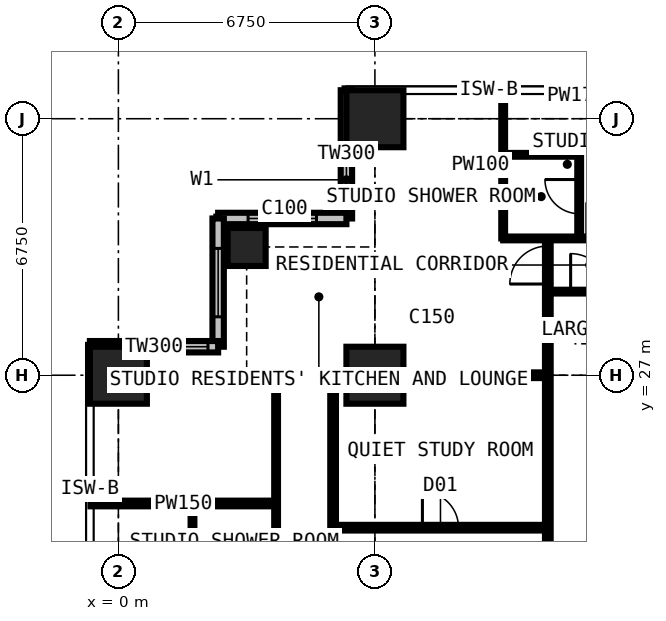
"""IFC4 building model, lengths in metres.
Left out: names, types, materials, properties, quantities, classifications, styles, units other than length and angle.
Written with IfcOpenShell. Run it as: python <this file> out.ifc"""

import sys

from ifc_helpers import new_model, si_unit, direction, frame, frame_2d, origin, origin_2d, place, context, subcontext, project, spatial, rectangle, extrude, element, fill, save


model = new_model("IFC4")
c1 = context("Model", 3, precision=1e-05, world=origin(), true_north=direction((0.0, 1.0)))
c2 = subcontext(c1, "Body", "Model", "MODEL_VIEW")
j1 = project(units=[si_unit("LENGTHUNIT", "METRE"), si_unit("PLANEANGLEUNIT", "RADIAN")], contexts=[c1])
p1 = place(None, origin())
s1 = spatial("IfcSite", under=j1, at=p1, CompositionType="ELEMENT")
p2 = place(p1, origin())
s2 = spatial("IfcBuilding", under=s1, at=p2, CompositionType="ELEMENT")
p3 = place(p2, frame((0.0, 0.0, 130.5)))
s3 = spatial("IfcBuildingStorey", under=s2, at=p3, CompositionType="ELEMENT", Elevation=130.5)
p4 = place(p3, frame((0.0, 27.0, 0.0), z_axis=(0.0, 0.0, 1.0), x_axis=(1.0, 0.0, 0.0)))
e1 = element("IfcColumn", 1, at=p4, inside=s3, PredefinedType="COLUMN", context=c2, shape_type="SweptSolid", body=[
    extrude(rectangle(XDim=1.5, YDim=1.5, at=origin_2d()), origin(), (0.0, 0.0, 1.0), 3.6),
])
p5 = place(p3, frame((3.375, 30.375, 0.0), z_axis=(0.0, 0.0, 1.0), x_axis=(1.0, 0.0, 0.0)))
e2 = element("IfcColumn", 2, at=p5, inside=s3, PredefinedType="COLUMN", context=c2, shape_type="SweptSolid", body=[
    extrude(rectangle(XDim=1.0, YDim=1.0, at=origin_2d()), origin(), (0.0, 0.0, 1.0), 3.6),
])
for number, where, z_axis, x_axis in (
    (3, (6.75, 27.0, 0.0), (0.0, 0.0, 1.0), (1.0, 0.0, 0.0)),
    (4, (6.75, 33.75, 0.0), (0.0, 0.0, 1.0), (1.0, 0.0, 0.0)),
):
    element("IfcColumn", number, at=place(p3, frame(where, z_axis=z_axis, x_axis=x_axis)), inside=s3, PredefinedType="COLUMN", context=c2, shape_type="SweptSolid", body=[
        extrude(rectangle(XDim=1.5, YDim=1.5, at=origin_2d()), origin(), (0.0, 0.0, 1.0), 3.6),
    ])
p6 = place(p3, frame((6.0, 34.5, 0.0), z_axis=(0.0, 0.0, 1.0), x_axis=(0.0, -1.0, 0.0)))
e5 = element("IfcWall", 5, at=p6, inside=s3, PredefinedType="SOLIDWALL", context=c2, shape_type="SweptSolid", body=[
    extrude(rectangle(XDim=3.375, YDim=0.3, at=frame_2d((1.688, 0.0))), origin(), (0.0, 0.0, 1.0), 3.375),
])
p7 = place(p6, frame((1.607, 0.0, 0.9)))
e6 = element("IfcOpeningElement", 6, at=p7, cuts=e5, PredefinedType="OPENING", context=c2, shape_type="SweptSolid", body=[
    extrude(rectangle(XDim=1.5, YDim=1.8, at=frame_2d((0.75, 0.9))), frame((0.0, 0.16, 0.0), z_axis=(0.0, -1.0, 0.0), x_axis=(1.0, 0.0, 0.0)), (0.0, 0.0, 1.0), 0.32),
])
p8 = place(p3, frame((6.0, 31.125, 0.0), z_axis=(0.0, 0.0, 1.0), x_axis=(-1.0, 0.0, 0.0)))
e7 = element("IfcWall", 7, at=p8, inside=s3, PredefinedType="SOLIDWALL", context=c2, shape_type="SweptSolid", body=[
    extrude(rectangle(XDim=3.375, YDim=0.3, at=frame_2d((1.688, 0.0))), origin(), (0.0, 0.0, 1.0), 3.375),
])
p9 = place(p8, frame((0.788, 0.0, 0.6)))
e8 = element("IfcOpeningElement", 8, at=p9, cuts=e7, PredefinedType="OPENING", context=c2, shape_type="SweptSolid", body=[
    extrude(rectangle(XDim=1.8, YDim=2.1, at=frame_2d((0.9, 1.05))), frame((0.0, 0.16, 0.0), z_axis=(0.0, -1.0, 0.0), x_axis=(1.0, 0.0, 0.0)), (0.0, 0.0, 1.0), 0.32),
])
p10 = place(p3, frame((2.625, 31.125, 0.0), z_axis=(0.0, 0.0, 1.0), x_axis=(0.0, -1.0, 0.0)))
e9 = element("IfcWall", 9, at=p10, inside=s3, PredefinedType="SOLIDWALL", context=c2, shape_type="SweptSolid", body=[
    extrude(rectangle(XDim=3.375, YDim=0.3, at=frame_2d((1.688, 0.0))), origin(), (0.0, 0.0, 1.0), 3.375),
])
p11 = place(p10, frame((0.788, 0.0, 0.6)))
e10 = element("IfcOpeningElement", 10, at=p11, cuts=e9, PredefinedType="OPENING", context=c2, shape_type="SweptSolid", body=[
    extrude(rectangle(XDim=1.8, YDim=2.1, at=frame_2d((0.9, 1.05))), frame((0.0, 0.16, 0.0), z_axis=(0.0, -1.0, 0.0), x_axis=(1.0, 0.0, 0.0)), (0.0, 0.0, 1.0), 0.32),
])
p12 = place(p3, frame((2.625, 27.75, 0.0), z_axis=(0.0, 0.0, 1.0), x_axis=(-1.0, 0.0, 0.0)))
e11 = element("IfcWall", 11, at=p12, inside=s3, PredefinedType="SOLIDWALL", context=c2, shape_type="SweptSolid", body=[
    extrude(rectangle(XDim=3.375, YDim=0.3, at=frame_2d((1.688, 0.0))), origin(), (0.0, 0.0, 1.0), 3.375),
])
p13 = place(p12, frame((0.268, 0.0, 0.9)))
e12 = element("IfcOpeningElement", 12, at=p13, cuts=e11, PredefinedType="OPENING", context=c2, shape_type="SweptSolid", body=[
    extrude(rectangle(XDim=1.5, YDim=1.8, at=frame_2d((0.75, 0.9))), frame((0.0, 0.16, 0.0), z_axis=(0.0, -1.0, 0.0), x_axis=(1.0, 0.0, 0.0)), (0.0, 0.0, 1.0), 0.32),
])
p14 = place(p3, frame((-0.734, 23.625, 0.0), z_axis=(0.0, 0.0, 1.0), x_axis=(1.0, 0.0, 0.0)))
e13 = element("IfcWall", 13, at=p14, inside=s3, PredefinedType="PARTITIONING", context=c2, shape_type="SweptSolid", body=[
    extrude(rectangle(XDim=4.884, YDim=0.15, at=frame_2d((2.442, 0.0))), origin(), (0.0, 0.0, 1.0), 3.375),
])
p15 = place(p3, frame((1.95, 21.625, 0.0), z_axis=(0.0, 0.0, 1.0), x_axis=(0.0, 1.0, 0.0)))
e14 = element("IfcWall", 14, at=p15, inside=s3, PredefinedType="PARTITIONING", context=c2, shape_type="SweptSolid", body=[
    extrude(rectangle(XDim=2.0, YDim=0.1, at=frame_2d((1.0, 0.0))), origin(), (0.0, 0.0, 1.0), 3.375),
])
p16 = place(p3, frame((4.15, 10.125, 0.0), z_axis=(0.0, 0.0, 1.0), x_axis=(0.0, 1.0, 0.0)))
e15 = element("IfcWall", 15, at=p16, inside=s3, PredefinedType="PARTITIONING", context=c2, shape_type="SweptSolid", body=[
    extrude(rectangle(XDim=16.875, YDim=0.1, at=frame_2d((8.438, 0.0))), origin(), (0.0, 0.0, 1.0), 3.375),
])
p17 = place(p16, frame((0.2, 0.0, 0.0)))
e16 = element("IfcOpeningElement", 16, at=p17, cuts=e15, PredefinedType="OPENING", context=c2, shape_type="SweptSolid", body=[
    extrude(rectangle(XDim=0.95, YDim=2.2, at=frame_2d((0.475, 1.1))), frame((0.0, 0.06, 0.0), z_axis=(0.0, -1.0, 0.0), x_axis=(1.0, 0.0, 0.0)), (0.0, 0.0, 1.0), 0.12),
])
p18 = place(p16, frame((3.625, 0.0, 0.0)))
e17 = element("IfcOpeningElement", 17, at=p18, cuts=e15, PredefinedType="OPENING", context=c2, shape_type="SweptSolid", body=[
    extrude(rectangle(XDim=0.95, YDim=2.2, at=frame_2d((0.475, 1.1))), frame((0.0, 0.06, 0.0), z_axis=(0.0, -1.0, 0.0), x_axis=(1.0, 0.0, 0.0)), (0.0, 0.0, 1.0), 0.12),
])
p19 = place(p16, frame((7.0, 0.0, 0.0)))
e18 = element("IfcOpeningElement", 18, at=p19, cuts=e15, PredefinedType="OPENING", context=c2, shape_type="SweptSolid", body=[
    extrude(rectangle(XDim=0.95, YDim=2.2, at=frame_2d((0.475, 1.1))), frame((0.0, 0.06, 0.0), z_axis=(0.0, -1.0, 0.0), x_axis=(1.0, 0.0, 0.0)), (0.0, 0.0, 1.0), 0.12),
])
p20 = place(p16, frame((10.375, 0.0, 0.0)))
e19 = element("IfcOpeningElement", 19, at=p20, cuts=e15, PredefinedType="OPENING", context=c2, shape_type="SweptSolid", body=[
    extrude(rectangle(XDim=0.95, YDim=2.2, at=frame_2d((0.475, 1.1))), frame((0.0, 0.06, 0.0), z_axis=(0.0, -1.0, 0.0), x_axis=(1.0, 0.0, 0.0)), (0.0, 0.0, 1.0), 0.12),
])
p21 = place(p3, frame((4.15, 27.0, 0.0), z_axis=(0.0, 0.0, 1.0), x_axis=(1.0, 0.0, 0.0)))
e20 = element("IfcWall", 20, at=p21, inside=s3, PredefinedType="PARTITIONING", context=c2, shape_type="SweptSolid", body=[
    extrude(rectangle(XDim=7.15, YDim=0.15, at=frame_2d((3.575, 0.0))), origin(), (0.0, 0.0, 1.0), 2.806),
])
p22 = place(p3, frame((5.65, 22.988, 0.0), z_axis=(0.0, 0.0, 1.0), x_axis=(0.0, 1.0, 0.0)))
e21 = element("IfcWall", 21, at=p22, inside=s3, PredefinedType="PARTITIONING", context=c2, shape_type="SweptSolid", body=[
    extrude(rectangle(XDim=4.012, YDim=0.15, at=frame_2d((2.006, 0.0))), origin(), (0.0, 0.0, 1.0), 3.375),
])
p23 = place(p3, frame((5.65, 22.988, 0.0), z_axis=(0.0, 0.0, 1.0), x_axis=(1.0, 0.0, 0.0)))
e22 = element("IfcWall", 22, at=p23, inside=s3, PredefinedType="PARTITIONING", context=c2, shape_type="SweptSolid", body=[
    extrude(rectangle(XDim=5.65, YDim=0.15, at=frame_2d((2.825, 0.0))), origin(), (0.0, 0.0, 1.0), 3.375),
])
p24 = place(p23, frame((2.35, 0.0, 0.0)))
e23 = element("IfcOpeningElement", 23, at=p24, cuts=e22, PredefinedType="OPENING", context=c2, shape_type="SweptSolid", body=[
    extrude(rectangle(XDim=0.95, YDim=2.2, at=frame_2d((0.475, 1.1))), frame((0.0, 0.085, 0.0), z_axis=(0.0, -1.0, 0.0), x_axis=(1.0, 0.0, 0.0)), (0.0, 0.0, 1.0), 0.17),
])
p25 = place(p3, frame((10.125, 30.6, 0.0), z_axis=(0.0, 0.0, 1.0), x_axis=(0.0, 1.0, 0.0)))
e24 = element("IfcWall", 24, at=p25, inside=s3, PredefinedType="PARTITIONING", context=c2, shape_type="SweptSolid", body=[
    extrude(rectangle(XDim=3.884, YDim=0.1, at=frame_2d((1.942, 0.0))), origin(), (0.0, 0.0, 1.0), 3.375),
])
p26 = place(p3, frame((10.125, 30.6, 0.0), z_axis=(0.0, 0.0, 1.0), x_axis=(1.0, 0.0, 0.0)))
e25 = element("IfcWall", 25, at=p26, inside=s3, PredefinedType="PARTITIONING", context=c2, shape_type="SweptSolid", body=[
    extrude(rectangle(XDim=3.375, YDim=0.1, at=frame_2d((1.688, 0.0))), origin(), (0.0, 0.0, 1.0), 3.375),
])
p27 = place(p26, frame((2.2, 0.0, 0.0)))
e26 = element("IfcOpeningElement", 26, at=p27, cuts=e25, PredefinedType="OPENING", context=c2, shape_type="SweptSolid", body=[
    extrude(rectangle(XDim=0.95, YDim=2.2, at=frame_2d((0.475, 1.1))), frame((0.0, 0.06, 0.0), z_axis=(0.0, -1.0, 0.0), x_axis=(1.0, 0.0, 0.0)), (0.0, 0.0, 1.0), 0.12),
])
p28 = place(p3, frame((10.125, 32.8, 0.0), z_axis=(0.0, 0.0, 1.0), x_axis=(1.0, 0.0, 0.0)))
e27 = element("IfcWall", 27, at=p28, inside=s3, PredefinedType="PARTITIONING", context=c2, shape_type="SweptSolid", body=[
    extrude(rectangle(XDim=2.0, YDim=0.1, at=frame_2d((1.0, 0.0))), origin(), (0.0, 0.0, 1.0), 3.375),
])
p29 = place(p3, frame((11.3, 11.3, 0.0), z_axis=(0.0, 0.0, 1.0), x_axis=(0.0, 1.0, 0.0)))
e28 = element("IfcWall", 28, at=p29, inside=s3, PredefinedType="PARTITIONING", context=c2, shape_type="SweptSolid", body=[
    extrude(rectangle(XDim=19.3, YDim=0.15, at=frame_2d((9.65, 0.0))), origin(), (0.0, 0.0, 1.0), 3.375),
])
p30 = place(p29, frame((18.1, 0.0, 0.0)))
e29 = element("IfcOpeningElement", 29, at=p30, cuts=e28, PredefinedType="OPENING", context=c2, shape_type="SweptSolid", body=[
    extrude(rectangle(XDim=1.0, YDim=2.2, at=frame_2d((0.5, 1.1))), frame((0.0, 0.085, 0.0), z_axis=(0.0, -1.0, 0.0), x_axis=(1.0, 0.0, 0.0)), (0.0, 0.0, 1.0), 0.17),
])
p31 = place(p29, frame((10.137, 0.0, 0.0)))
e30 = element("IfcOpeningElement", 30, at=p31, cuts=e28, PredefinedType="OPENING", context=c2, shape_type="SweptSolid", body=[
    extrude(rectangle(XDim=1.0, YDim=2.2, at=frame_2d((0.5, 1.1))), frame((0.0, 0.085, 0.0), z_axis=(0.0, -1.0, 0.0), x_axis=(1.0, 0.0, 0.0)), (0.0, 0.0, 1.0), 0.17),
])
p32 = place(p3, frame((11.3, 29.2, 0.0), z_axis=(0.0, 0.0, 1.0), x_axis=(1.0, 0.0, 0.0)))
e31 = element("IfcWall", 31, at=p32, inside=s3, PredefinedType="PARTITIONING", context=c2, shape_type="SweptSolid", body=[
    extrude(rectangle(XDim=19.075, YDim=0.1, at=frame_2d((9.538, 0.0))), origin(), (0.0, 0.0, 1.0), 3.375),
])
p33 = place(p32, frame((6.4, 0.0, 0.0)))
e32 = element("IfcOpeningElement", 32, at=p33, cuts=e31, PredefinedType="OPENING", context=c2, shape_type="SweptSolid", body=[
    extrude(rectangle(XDim=0.95, YDim=2.2, at=frame_2d((0.475, 1.1))), frame((0.0, 0.06, 0.0), z_axis=(0.0, -1.0, 0.0), x_axis=(1.0, 0.0, 0.0)), (0.0, 0.0, 1.0), 0.12),
])
p34 = place(p32, frame((13.15, 0.0, 0.0)))
e33 = element("IfcOpeningElement", 33, at=p34, cuts=e31, PredefinedType="OPENING", context=c2, shape_type="SweptSolid", body=[
    extrude(rectangle(XDim=0.95, YDim=2.2, at=frame_2d((0.475, 1.1))), frame((0.0, 0.06, 0.0), z_axis=(0.0, -1.0, 0.0), x_axis=(1.0, 0.0, 0.0)), (0.0, 0.0, 1.0), 0.12),
])
p35 = place(p32, frame((0.6, 0.0, 0.0)))
e34 = element("IfcOpeningElement", 34, at=p35, cuts=e31, PredefinedType="OPENING", context=c2, shape_type="SweptSolid", body=[
    extrude(rectangle(XDim=1.0, YDim=2.2, at=frame_2d((0.5, 1.1))), frame((0.0, 0.06, 0.0), z_axis=(0.0, -1.0, 0.0), x_axis=(1.0, 0.0, 0.0)), (0.0, 0.0, 1.0), 0.12),
])
p36 = place(p3, frame((12.125, 30.6, 0.0), z_axis=(0.0, 0.0, 1.0), x_axis=(0.0, 1.0, 0.0)))
e35 = element("IfcWall", 35, at=p36, inside=s3, PredefinedType="PARTITIONING", context=c2, shape_type="SweptSolid", body=[
    extrude(rectangle(XDim=2.2, YDim=0.1, at=frame_2d((1.1, 0.0))), origin(), (0.0, 0.0, 1.0), 3.375),
])
p37 = place(p36, frame((0.65, 0.0, 0.0)))
e36 = element("IfcOpeningElement", 36, at=p37, cuts=e35, PredefinedType="OPENING", context=c2, shape_type="SweptSolid", body=[
    extrude(rectangle(XDim=0.9, YDim=2.2, at=frame_2d((0.45, 1.1))), frame((0.0, 0.06, 0.0), z_axis=(0.0, -1.0, 0.0), x_axis=(1.0, 0.0, 0.0)), (0.0, 0.0, 1.0), 0.12),
])
p38 = place(p7, origin())
e37 = element("IfcWindow", 37, at=p38, inside=s3, PartitioningType="SINGLE_PANEL", PredefinedType="WINDOW", context=c2, shape_type="SweptSolid", body=[
    extrude(rectangle(XDim=1.5, YDim=1.8, at=frame_2d((0.75, 0.9))), frame((0.0, 0.03, 0.0), z_axis=(0.0, -1.0, 0.0), x_axis=(1.0, 0.0, 0.0)), (0.0, 0.0, 1.0), 0.06),
])
fill(e6, e37)
p39 = place(p9, origin())
e38 = element("IfcWindow", 38, at=p39, inside=s3, PartitioningType="SINGLE_PANEL", PredefinedType="WINDOW", context=c2, shape_type="SweptSolid", body=[
    extrude(rectangle(XDim=1.8, YDim=2.1, at=frame_2d((0.9, 1.05))), frame((0.0, 0.03, 0.0), z_axis=(0.0, -1.0, 0.0), x_axis=(1.0, 0.0, 0.0)), (0.0, 0.0, 1.0), 0.06),
])
fill(e8, e38)
p40 = place(p11, origin())
e39 = element("IfcWindow", 39, at=p40, inside=s3, PartitioningType="SINGLE_PANEL", PredefinedType="WINDOW", context=c2, shape_type="SweptSolid", body=[
    extrude(rectangle(XDim=1.8, YDim=2.1, at=frame_2d((0.9, 1.05))), frame((0.0, 0.03, 0.0), z_axis=(0.0, -1.0, 0.0), x_axis=(1.0, 0.0, 0.0)), (0.0, 0.0, 1.0), 0.06),
])
fill(e10, e39)
p41 = place(p13, origin())
e40 = element("IfcWindow", 40, at=p41, inside=s3, PartitioningType="SINGLE_PANEL", PredefinedType="WINDOW", context=c2, shape_type="SweptSolid", body=[
    extrude(rectangle(XDim=1.5, YDim=1.8, at=frame_2d((0.75, 0.9))), frame((0.0, 0.03, 0.0), z_axis=(0.0, -1.0, 0.0), x_axis=(1.0, 0.0, 0.0)), (0.0, 0.0, 1.0), 0.06),
])
fill(e12, e40)
p42 = place(p37, origin())
e41 = element("IfcDoor", 41, at=p42, inside=s3, OperationType="SINGLE_SWING_RIGHT", PredefinedType="DOOR", context=c2, shape_type="SweptSolid", body=[
    extrude(rectangle(XDim=0.9, YDim=2.2, at=frame_2d((0.45, 1.1))), frame((0.0, 0.025, 0.0), z_axis=(0.0, -1.0, 0.0), x_axis=(1.0, 0.0, 0.0)), (0.0, 0.0, 1.0), 0.05),
])
fill(e36, e41)
p43 = place(p35, origin())
e42 = element("IfcDoor", 42, at=p43, inside=s3, OperationType="SINGLE_SWING_LEFT", PredefinedType="DOOR", context=c2, shape_type="SweptSolid", body=[
    extrude(rectangle(XDim=1.0, YDim=2.2, at=frame_2d((0.5, 1.1))), frame((0.0, 0.025, 0.0), z_axis=(0.0, -1.0, 0.0), x_axis=(1.0, 0.0, 0.0)), (0.0, 0.0, 1.0), 0.05),
])
fill(e34, e42)
p44 = place(p30, origin())
e43 = element("IfcDoor", 43, at=p44, inside=s3, OperationType="SINGLE_SWING_LEFT", PredefinedType="DOOR", context=c2, shape_type="SweptSolid", body=[
    extrude(rectangle(XDim=1.0, YDim=2.2, at=frame_2d((0.5, 1.1))), frame((0.0, 0.025, 0.0), z_axis=(0.0, -1.0, 0.0), x_axis=(1.0, 0.0, 0.0)), (0.0, 0.0, 1.0), 0.05),
])
fill(e29, e43)
p45 = place(p24, origin())
e44 = element("IfcDoor", 44, at=p45, inside=s3, OperationType="SINGLE_SWING_LEFT", PredefinedType="DOOR", context=c2, shape_type="SweptSolid", body=[
    extrude(rectangle(XDim=0.95, YDim=2.2, at=frame_2d((0.475, 1.1))), frame((0.0, 0.025, 0.0), z_axis=(0.0, -1.0, 0.0), x_axis=(1.0, 0.0, 0.0)), (0.0, 0.0, 1.0), 0.05),
])
fill(e23, e44)
save(model, sys.argv[1])
